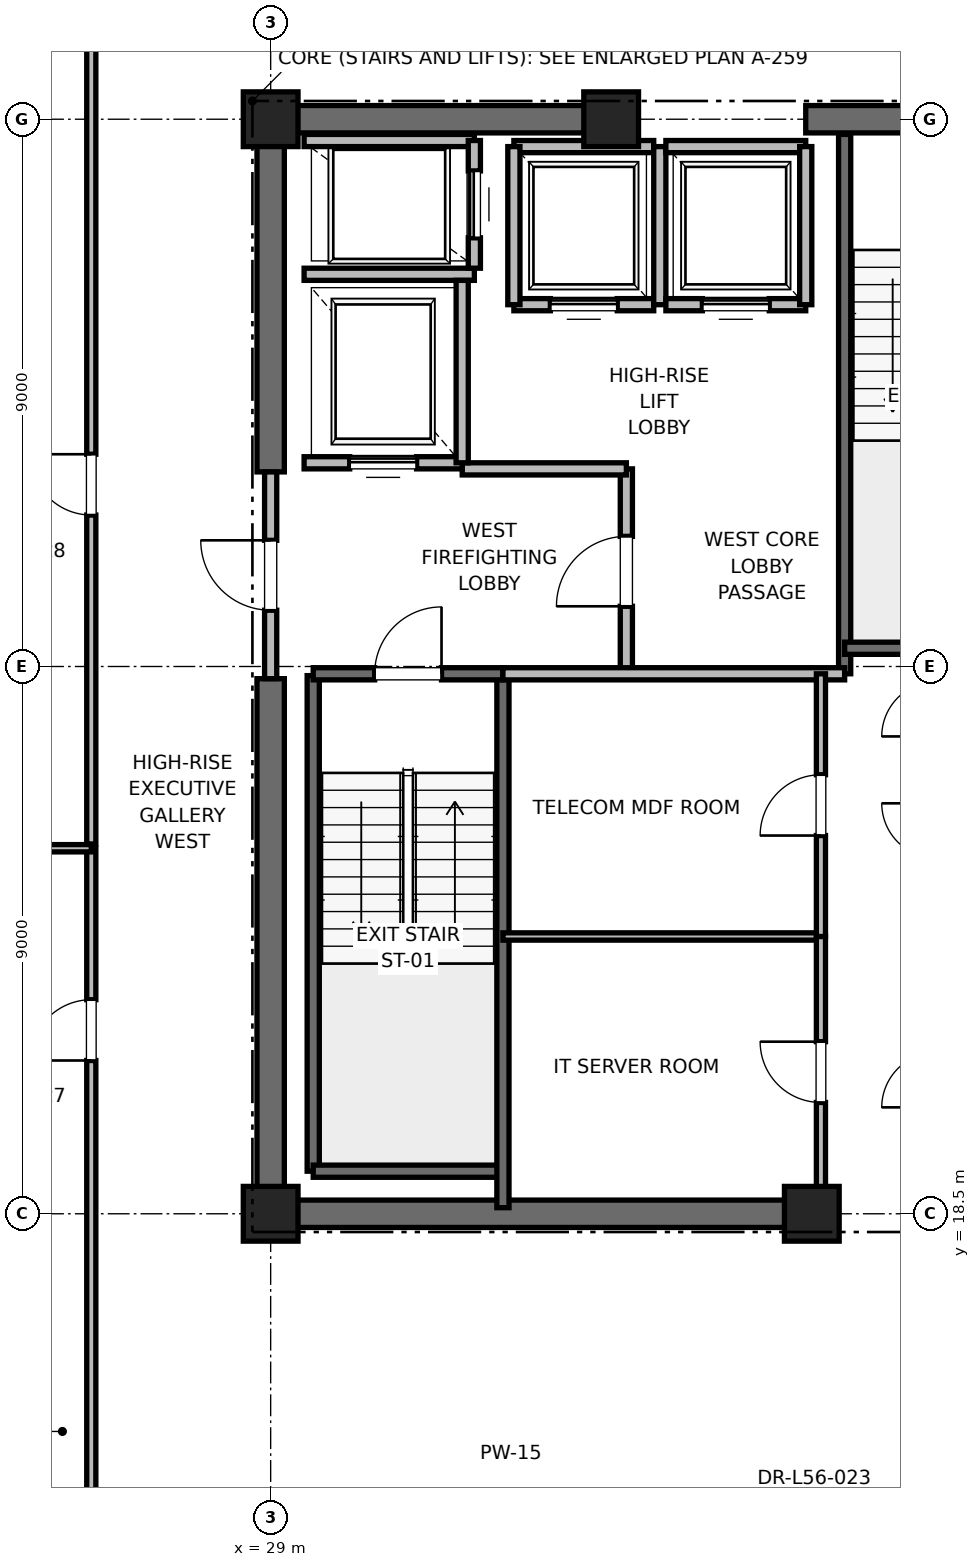
"""IFC4 building model, lengths in metres.
Left out: names, types, materials, properties, quantities, classifications, styles, units other than length and angle.
Written with IfcOpenShell. Run it as: python <this file> out.ifc"""

import sys

from ifc_helpers import new_model, si_unit, direction, frame, frame_2d, origin, origin_2d, place, context, subcontext, project, spatial, rectangle, extrude, element, fill, save


model = new_model("IFC4")
c1 = context("Model", 3, precision=1e-05, world=origin(), true_north=direction((0.0, 1.0)))
c2 = subcontext(c1, "Body", "Model", "MODEL_VIEW")
j1 = project(units=[si_unit("LENGTHUNIT", "METRE"), si_unit("PLANEANGLEUNIT", "RADIAN")], contexts=[c1])
p1 = place(None, origin())
s1 = spatial("IfcSite", under=j1, at=p1, CompositionType="ELEMENT")
p2 = place(p1, origin())
s2 = spatial("IfcBuilding", under=s1, at=p2, CompositionType="ELEMENT")
p3 = place(p2, frame((0.0, 0.0, 243.2)))
s3 = spatial("IfcBuildingStorey", under=s2, at=p3, CompositionType="ELEMENT", Elevation=243.2)
for number, where, z_axis, x_axis in (
    (1, (29.0, 18.5, 0.0), (0.0, 0.0, 1.0), (1.0, 0.0, 0.0)),
    (2, (29.0, 36.5, 0.0), (0.0, 0.0, 1.0), (1.0, 0.0, 0.0)),
    (3, (37.9, 18.5, 0.0), (0.0, 0.0, 1.0), (1.0, 0.0, 0.0)),
    (4, (34.6, 36.5, 0.0), (0.0, 0.0, 1.0), (1.0, 0.0, 0.0)),
):
    element("IfcColumn", number, at=place(p3, frame(where, z_axis=z_axis, x_axis=x_axis)), inside=s3, PredefinedType="PILASTER", context=c2, shape_type="SweptSolid", body=[
        extrude(rectangle(XDim=0.9, YDim=0.9, at=origin_2d()), origin(), (0.0, 0.0, 1.0), 4.0),
    ])
p4 = place(p3, frame((29.0, 18.5, 0.0), z_axis=(0.0, 0.0, 1.0), x_axis=(1.0, 0.0, 0.0)))
e5 = element("IfcWall", 5, at=p4, inside=s3, PredefinedType="SHEAR", context=c2, shape_type="SweptSolid", body=[
    extrude(rectangle(XDim=9.2, YDim=0.45, at=frame_2d((4.6, 0.0))), origin(), (0.0, 0.0, 1.0), 3.785),
])
p5 = place(p3, frame((29.0, 36.5, 0.0), z_axis=(0.0, 0.0, 1.0), x_axis=(1.0, 0.0, 0.0)))
e6 = element("IfcWall", 6, at=p5, inside=s3, PredefinedType="SHEAR", context=c2, shape_type="SweptSolid", body=[
    extrude(rectangle(XDim=5.8, YDim=0.45, at=frame_2d((2.9, 0.0))), origin(), (0.0, 0.0, 1.0), 3.785),
])
p6 = place(p3, frame((37.8, 36.5, 0.0), z_axis=(0.0, 0.0, 1.0), x_axis=(1.0, 0.0, 0.0)))
e7 = element("IfcWall", 7, at=p6, inside=s3, PredefinedType="SHEAR", context=c2, shape_type="SweptSolid", body=[
    extrude(rectangle(XDim=4.4, YDim=0.45, at=frame_2d((2.2, 0.0))), origin(), (0.0, 0.0, 1.0), 3.785),
])
p7 = place(p6, frame((1.65, 0.0, 0.0)))
e8 = element("IfcOpeningElement", 8, at=p7, cuts=e7, PredefinedType="OPENING", context=c2, shape_type="SweptSolid", body=[
    extrude(rectangle(XDim=1.1, YDim=2.15, at=frame_2d((0.55, 1.075))), frame((0.0, 0.225, 0.0), z_axis=(0.0, -1.0, 0.0), x_axis=(1.0, 0.0, 0.0)), (0.0, 0.0, 1.0), 0.45),
])
p8 = place(p3, frame((29.0, 18.5, 0.0), z_axis=(0.0, 0.0, 1.0), x_axis=(0.0, 1.0, 0.0)))
e9 = element("IfcWall", 9, at=p8, inside=s3, PredefinedType="SHEAR", context=c2, shape_type="SweptSolid", body=[
    extrude(rectangle(XDim=8.8, YDim=0.45, at=frame_2d((4.4, 0.0))), origin(), (0.0, 0.0, 1.0), 3.785),
])
p9 = place(p3, frame((29.0, 30.7, 0.0), z_axis=(0.0, 0.0, 1.0), x_axis=(0.0, 1.0, 0.0)))
e10 = element("IfcWall", 10, at=p9, inside=s3, PredefinedType="SHEAR", context=c2, shape_type="SweptSolid", body=[
    extrude(rectangle(XDim=5.8, YDim=0.45, at=frame_2d((2.9, 0.0))), origin(), (0.0, 0.0, 1.0), 3.785),
])
p10 = place(p3, frame((29.7, 19.2, 0.0), z_axis=(0.0, 0.0, 1.0), x_axis=(0.0, 1.0, 0.0)))
e11 = element("IfcWall", 11, at=p10, inside=s3, PredefinedType="SOLIDWALL", context=c2, shape_type="SweptSolid", body=[
    extrude(rectangle(XDim=8.15, YDim=0.2, at=frame_2d((4.075, 0.0))), origin(), (0.0, 0.0, 1.0), 3.785),
])
p11 = place(p3, frame((29.7, 19.2, 0.0), z_axis=(0.0, 0.0, 1.0), x_axis=(1.0, 0.0, 0.0)))
e12 = element("IfcWall", 12, at=p11, inside=s3, PredefinedType="SOLIDWALL", context=c2, shape_type="SweptSolid", body=[
    extrude(rectangle(XDim=3.12, YDim=0.2, at=frame_2d((1.56, 0.0))), origin(), (0.0, 0.0, 1.0), 3.785),
])
p12 = place(p3, frame((32.82, 18.6, 0.0), z_axis=(0.0, 0.0, 1.0), x_axis=(0.0, 1.0, 0.0)))
e13 = element("IfcWall", 13, at=p12, inside=s3, PredefinedType="SOLIDWALL", context=c2, shape_type="SweptSolid", body=[
    extrude(rectangle(XDim=8.78, YDim=0.2, at=frame_2d((4.39, 0.0))), origin(), (0.0, 0.0, 1.0), 3.785),
])
p13 = place(p3, frame((29.7, 27.38, 0.0), z_axis=(0.0, 0.0, 1.0), x_axis=(1.0, 0.0, 0.0)))
e14 = element("IfcWall", 14, at=p13, inside=s3, PredefinedType="SOLIDWALL", context=c2, shape_type="SweptSolid", body=[
    extrude(rectangle(XDim=3.12, YDim=0.2, at=frame_2d((1.56, 0.0))), origin(), (0.0, 0.0, 1.0), 3.785),
])
p14 = place(p13, frame((1.01, 0.0, 0.0)))
e15 = element("IfcOpeningElement", 15, at=p14, cuts=e14, PredefinedType="OPENING", context=c2, shape_type="SweptSolid", body=[
    extrude(rectangle(XDim=1.1, YDim=2.15, at=frame_2d((0.55, 1.075))), frame((0.0, 0.1, 0.0), z_axis=(0.0, -1.0, 0.0), x_axis=(1.0, 0.0, 0.0)), (0.0, 0.0, 1.0), 0.2),
])
p15 = place(p3, frame((38.44, 27.38, 0.0), z_axis=(0.0, 0.0, 1.0), x_axis=(0.0, 1.0, 0.0)))
e16 = element("IfcWall", 16, at=p15, inside=s3, PredefinedType="SOLIDWALL", context=c2, shape_type="SweptSolid", body=[
    extrude(rectangle(XDim=8.87, YDim=0.2, at=frame_2d((4.435, 0.0))), origin(), (0.0, 0.0, 1.0), 3.785),
])
p16 = place(p3, frame((38.44, 27.8, 0.0), z_axis=(0.0, 0.0, 1.0), x_axis=(1.0, 0.0, 0.0)))
e17 = element("IfcWall", 17, at=p16, inside=s3, PredefinedType="SOLIDWALL", context=c2, shape_type="SweptSolid", body=[
    extrude(rectangle(XDim=3.32, YDim=0.2, at=frame_2d((1.66, 0.0))), origin(), (0.0, 0.0, 1.0), 3.785),
])
p17 = place(p3, frame((34.85, 27.38, 0.0), z_axis=(0.0, 0.0, 1.0), x_axis=(0.0, 1.0, 0.0)))
e18 = element("IfcWall", 18, at=p17, inside=s3, PredefinedType="PARTITIONING", context=c2, shape_type="SweptSolid", body=[
    extrude(rectangle(XDim=3.37, YDim=0.2, at=frame_2d((1.685, 0.0))), origin(), (0.0, 0.0, 1.0), 3.785),
])
p18 = place(p17, frame((1.11, 0.0, 0.0)))
e19 = element("IfcOpeningElement", 19, at=p18, cuts=e18, PredefinedType="OPENING", context=c2, shape_type="SweptSolid", body=[
    extrude(rectangle(XDim=1.15, YDim=2.2, at=frame_2d((0.575, 1.1))), frame((0.0, 0.1, 0.0), z_axis=(0.0, -1.0, 0.0), x_axis=(1.0, 0.0, 0.0)), (0.0, 0.0, 1.0), 0.2),
])
p19 = place(p3, frame((29.0, 27.3, 0.0), z_axis=(0.0, 0.0, 1.0), x_axis=(0.0, 1.0, 0.0)))
e20 = element("IfcWall", 20, at=p19, inside=s3, PredefinedType="PARTITIONING", context=c2, shape_type="SweptSolid", body=[
    extrude(rectangle(XDim=3.4, YDim=0.2, at=frame_2d((1.7, 0.0))), origin(), (0.0, 0.0, 1.0), 2.865),
])
p20 = place(p19, frame((1.125, 0.0, 0.0)))
e21 = element("IfcOpeningElement", 21, at=p20, cuts=e20, PredefinedType="OPENING", context=c2, shape_type="SweptSolid", body=[
    extrude(rectangle(XDim=1.15, YDim=2.2, at=frame_2d((0.575, 1.1))), frame((0.0, 0.1, 0.0), z_axis=(0.0, -1.0, 0.0), x_axis=(1.0, 0.0, 0.0)), (0.0, 0.0, 1.0), 0.2),
])
p21 = place(p3, frame((32.82, 27.38, 0.0), z_axis=(0.0, 0.0, 1.0), x_axis=(1.0, 0.0, 0.0)))
e22 = element("IfcWall", 22, at=p21, inside=s3, PredefinedType="PARTITIONING", context=c2, shape_type="SweptSolid", body=[
    extrude(rectangle(XDim=5.62, YDim=0.2, at=frame_2d((2.81, 0.0))), origin(), (0.0, 0.0, 1.0), 3.785),
])
p22 = place(p3, frame((32.15, 30.75, 0.0), z_axis=(0.0, 0.0, 1.0), x_axis=(1.0, 0.0, 0.0)))
e23 = element("IfcWall", 23, at=p22, inside=s3, PredefinedType="PARTITIONING", context=c2, shape_type="SweptSolid", body=[
    extrude(rectangle(XDim=2.7, YDim=0.2, at=frame_2d((1.35, 0.0))), origin(), (0.0, 0.0, 1.0), 3.785),
])
p23 = place(p3, frame((29.55, 30.85, 0.0), z_axis=(0.0, 0.0, 1.0), x_axis=(1.0, 0.0, 0.0)))
e24 = element("IfcWall", 24, at=p23, inside=s3, PredefinedType="SOLIDWALL", context=c2, shape_type="SweptSolid", body=[
    extrude(rectangle(XDim=2.6, YDim=0.2, at=frame_2d((1.3, 0.0))), origin(), (0.0, 0.0, 1.0), 2.865),
])
p24 = place(p23, frame((0.75, 0.0, 0.0)))
e25 = element("IfcOpeningElement", 25, at=p24, cuts=e24, PredefinedType="OPENING", context=c2, shape_type="SweptSolid", body=[
    extrude(rectangle(XDim=1.1, YDim=2.2, at=frame_2d((0.55, 1.1))), frame((0.0, 0.1, 0.0), z_axis=(0.0, -1.0, 0.0), x_axis=(1.0, 0.0, 0.0)), (0.0, 0.0, 1.0), 0.2),
])
p25 = place(p3, frame((29.55, 33.95, 0.0), z_axis=(0.0, 0.0, 1.0), x_axis=(1.0, 0.0, 0.0)))
e26 = element("IfcWall", 26, at=p25, inside=s3, PredefinedType="SOLIDWALL", context=c2, shape_type="SweptSolid", body=[
    extrude(rectangle(XDim=2.8, YDim=0.2, at=frame_2d((1.4, 0.0))), origin(), (0.0, 0.0, 1.0), 3.785),
])
p26 = place(p3, frame((32.15, 30.85, 0.0), z_axis=(0.0, 0.0, 1.0), x_axis=(0.0, 1.0, 0.0)))
e27 = element("IfcWall", 27, at=p26, inside=s3, PredefinedType="SOLIDWALL", context=c2, shape_type="SweptSolid", body=[
    extrude(rectangle(XDim=3.0, YDim=0.2, at=frame_2d((1.5, 0.0))), origin(), (0.0, 0.0, 1.0), 3.785),
])
p27 = place(p3, frame((32.35, 36.15, 0.0), z_axis=(0.0, 0.0, 1.0), x_axis=(-1.0, 0.0, 0.0)))
e28 = element("IfcWall", 28, at=p27, inside=s3, PredefinedType="SOLIDWALL", context=c2, shape_type="SweptSolid", body=[
    extrude(rectangle(XDim=2.8, YDim=0.2, at=frame_2d((1.4, 0.0))), origin(), (0.0, 0.0, 1.0), 3.148),
])
p28 = place(p3, frame((32.35, 34.05, 0.0), z_axis=(0.0, 0.0, 1.0), x_axis=(0.0, 1.0, 0.0)))
e29 = element("IfcWall", 29, at=p28, inside=s3, PredefinedType="SOLIDWALL", context=c2, shape_type="SweptSolid", body=[
    extrude(rectangle(XDim=2.1, YDim=0.2, at=frame_2d((1.05, 0.0))), origin(), (0.0, 0.0, 1.0), 3.785),
])
p29 = place(p28, frame((0.5, 0.0, 0.0)))
e30 = element("IfcOpeningElement", 30, at=p29, cuts=e29, PredefinedType="OPENING", context=c2, shape_type="SweptSolid", body=[
    extrude(rectangle(XDim=1.1, YDim=2.2, at=frame_2d((0.55, 1.1))), frame((0.0, 0.1, 0.0), z_axis=(0.0, -1.0, 0.0), x_axis=(1.0, 0.0, 0.0)), (0.0, 0.0, 1.0), 0.2),
])
p30 = place(p3, frame((33.0, 33.45, 0.0), z_axis=(0.0, 0.0, 1.0), x_axis=(1.0, 0.0, 0.0)))
e31 = element("IfcWall", 31, at=p30, inside=s3, PredefinedType="SOLIDWALL", context=c2, shape_type="SweptSolid", body=[
    extrude(rectangle(XDim=2.3, YDim=0.2, at=frame_2d((1.15, 0.0))), origin(), (0.0, 0.0, 1.0), 3.785),
])
p31 = place(p30, frame((0.6, 0.0, 0.0)))
e32 = element("IfcOpeningElement", 32, at=p31, cuts=e31, PredefinedType="OPENING", context=c2, shape_type="SweptSolid", body=[
    extrude(rectangle(XDim=1.1, YDim=2.2, at=frame_2d((0.55, 1.1))), frame((0.0, 0.1, 0.0), z_axis=(0.0, -1.0, 0.0), x_axis=(1.0, 0.0, 0.0)), (0.0, 0.0, 1.0), 0.2),
])
p32 = place(p3, frame((35.3, 36.05, 0.0), z_axis=(0.0, 0.0, 1.0), x_axis=(-1.0, 0.0, 0.0)))
e33 = element("IfcWall", 33, at=p32, inside=s3, PredefinedType="SOLIDWALL", context=c2, shape_type="SweptSolid", body=[
    extrude(rectangle(XDim=2.3, YDim=0.2, at=frame_2d((1.15, 0.0))), origin(), (0.0, 0.0, 1.0), 2.865),
])
p33 = place(p3, frame((33.0, 36.05, 0.0), z_axis=(0.0, 0.0, 1.0), x_axis=(0.0, -1.0, 0.0)))
e34 = element("IfcWall", 34, at=p33, inside=s3, PredefinedType="SOLIDWALL", context=c2, shape_type="SweptSolid", body=[
    extrude(rectangle(XDim=2.6, YDim=0.2, at=frame_2d((1.3, 0.0))), origin(), (0.0, 0.0, 1.0), 3.785),
])
p34 = place(p3, frame((35.4, 33.45, 0.0), z_axis=(0.0, 0.0, 1.0), x_axis=(0.0, 1.0, 0.0)))
e35 = element("IfcWall", 35, at=p34, inside=s3, PredefinedType="SOLIDWALL", context=c2, shape_type="SweptSolid", body=[
    extrude(rectangle(XDim=2.6, YDim=0.2, at=frame_2d((1.3, 0.0))), origin(), (0.0, 0.0, 1.0), 2.865),
])
p35 = place(p3, frame((35.5, 33.45, 0.0), z_axis=(0.0, 0.0, 1.0), x_axis=(1.0, 0.0, 0.0)))
e36 = element("IfcWall", 36, at=p35, inside=s3, PredefinedType="SOLIDWALL", context=c2, shape_type="SweptSolid", body=[
    extrude(rectangle(XDim=2.3, YDim=0.2, at=frame_2d((1.15, 0.0))), origin(), (0.0, 0.0, 1.0), 3.785),
])
p36 = place(p35, frame((0.6, 0.0, 0.0)))
e37 = element("IfcOpeningElement", 37, at=p36, cuts=e36, PredefinedType="OPENING", context=c2, shape_type="SweptSolid", body=[
    extrude(rectangle(XDim=1.1, YDim=2.2, at=frame_2d((0.55, 1.1))), frame((0.0, 0.1, 0.0), z_axis=(0.0, -1.0, 0.0), x_axis=(1.0, 0.0, 0.0)), (0.0, 0.0, 1.0), 0.2),
])
p37 = place(p3, frame((37.8, 36.05, 0.0), z_axis=(0.0, 0.0, 1.0), x_axis=(-1.0, 0.0, 0.0)))
e38 = element("IfcWall", 38, at=p37, inside=s3, PredefinedType="SOLIDWALL", context=c2, shape_type="SweptSolid", body=[
    extrude(rectangle(XDim=2.3, YDim=0.2, at=frame_2d((1.15, 0.0))), origin(), (0.0, 0.0, 1.0), 2.865),
])
p38 = place(p3, frame((37.8, 33.45, 0.0), z_axis=(0.0, 0.0, 1.0), x_axis=(0.0, 1.0, 0.0)))
e39 = element("IfcWall", 39, at=p38, inside=s3, PredefinedType="SOLIDWALL", context=c2, shape_type="SweptSolid", body=[
    extrude(rectangle(XDim=2.6, YDim=0.2, at=frame_2d((1.3, 0.0))), origin(), (0.0, 0.0, 1.0), 2.865),
])
p39 = place(p3, frame((32.82, 23.06, 0.0), z_axis=(0.0, 0.0, 1.0), x_axis=(1.0, 0.0, 0.0)))
e40 = element("IfcWall", 40, at=p39, inside=s3, PredefinedType="PARTITIONING", context=c2, shape_type="SweptSolid", body=[
    extrude(rectangle(XDim=5.23, YDim=0.12, at=frame_2d((2.615, 0.0))), origin(), (0.0, 0.0, 1.0), 2.85),
])
p40 = place(p3, frame((38.05, 18.6, 0.0), z_axis=(0.0, 0.0, 1.0), x_axis=(0.0, 1.0, 0.0)))
e41 = element("IfcWall", 41, at=p40, inside=s3, PredefinedType="PARTITIONING", context=c2, shape_type="SweptSolid", body=[
    extrude(rectangle(XDim=4.46, YDim=0.15, at=frame_2d((2.23, 0.0))), origin(), (0.0, 0.0, 1.0), 2.85),
])
p41 = place(p40, frame((1.73, 0.0, 0.0)))
e42 = element("IfcOpeningElement", 42, at=p41, cuts=e41, PredefinedType="OPENING", context=c2, shape_type="SweptSolid", body=[
    extrude(rectangle(XDim=1.0, YDim=2.15, at=frame_2d((0.5, 1.075))), frame((0.0, 0.075, 0.0), z_axis=(0.0, -1.0, 0.0), x_axis=(1.0, 0.0, 0.0)), (0.0, 0.0, 1.0), 0.15),
])
p42 = place(p3, frame((38.05, 23.06, 0.0), z_axis=(0.0, 0.0, 1.0), x_axis=(0.0, 1.0, 0.0)))
e43 = element("IfcWall", 43, at=p42, inside=s3, PredefinedType="PARTITIONING", context=c2, shape_type="SweptSolid", body=[
    extrude(rectangle(XDim=4.32, YDim=0.15, at=frame_2d((2.16, 0.0))), origin(), (0.0, 0.0, 1.0), 2.85),
])
p43 = place(p42, frame((1.66, 0.0, 0.0)))
e44 = element("IfcOpeningElement", 44, at=p43, cuts=e43, PredefinedType="OPENING", context=c2, shape_type="SweptSolid", body=[
    extrude(rectangle(XDim=1.0, YDim=2.15, at=frame_2d((0.5, 1.075))), frame((0.0, 0.075, 0.0), z_axis=(0.0, -1.0, 0.0), x_axis=(1.0, 0.0, 0.0)), (0.0, 0.0, 1.0), 0.15),
])
p44 = place(p3, frame((26.05, 8.82, 0.0), z_axis=(0.0, 0.0, 1.0), x_axis=(0.0, 1.0, 0.0)))
e45 = element("IfcWall", 45, at=p44, inside=s3, PredefinedType="PARTITIONING", context=c2, shape_type="SweptSolid", body=[
    extrude(rectangle(XDim=15.691, YDim=0.15, at=frame_2d((7.846, 0.0))), origin(), (0.0, 0.0, 1.0), 2.85),
])
p45 = place(p44, frame((12.201, 0.0, 0.0)))
e46 = element("IfcOpeningElement", 46, at=p45, cuts=e45, PredefinedType="OPENING", context=c2, shape_type="SweptSolid", body=[
    extrude(rectangle(XDim=1.0, YDim=2.15, at=frame_2d((0.5, 1.075))), frame((0.0, 0.075, 0.0), z_axis=(0.0, -1.0, 0.0), x_axis=(1.0, 0.0, 0.0)), (0.0, 0.0, 1.0), 0.15),
])
p46 = place(p3, frame((13.792, 24.511, 0.0), z_axis=(0.0, 0.0, 1.0), x_axis=(1.0, 0.0, 0.0)))
e47 = element("IfcWall", 47, at=p46, inside=s3, PredefinedType="PARTITIONING", context=c2, shape_type="SweptSolid", body=[
    extrude(rectangle(XDim=12.258, YDim=0.12, at=frame_2d((6.129, 0.0))), origin(), (0.0, 0.0, 1.0), 2.85),
])
p47 = place(p3, frame((26.05, 24.581, 0.0), z_axis=(0.0, 0.0, 1.0), x_axis=(0.0, 1.0, 0.0)))
e48 = element("IfcWall", 48, at=p47, inside=s3, PredefinedType="PARTITIONING", context=c2, shape_type="SweptSolid", body=[
    extrude(rectangle(XDim=21.599, YDim=0.15, at=frame_2d((10.799, 0.0))), origin(), (0.0, 0.0, 1.0), 2.85),
])
p48 = place(p47, frame((5.409, 0.0, 0.0)))
e49 = element("IfcOpeningElement", 49, at=p48, cuts=e48, PredefinedType="OPENING", context=c2, shape_type="SweptSolid", body=[
    extrude(rectangle(XDim=1.0, YDim=2.15, at=frame_2d((0.5, 1.075))), frame((0.0, 0.075, 0.0), z_axis=(0.0, -1.0, 0.0), x_axis=(1.0, 0.0, 0.0)), (0.0, 0.0, 1.0), 0.15),
])
p49 = place(p14, origin())
e50 = element("IfcDoor", 50, at=p49, inside=s3, OperationType="SINGLE_SWING_RIGHT", PredefinedType="DOOR", context=c2, shape_type="SweptSolid", body=[
    extrude(rectangle(XDim=1.1, YDim=2.15, at=frame_2d((0.55, 1.075))), frame((0.0, 0.025, 0.0), z_axis=(0.0, -1.0, 0.0), x_axis=(1.0, 0.0, 0.0)), (0.0, 0.0, 1.0), 0.05),
])
fill(e15, e50)
p50 = place(p18, origin())
e51 = element("IfcDoor", 51, at=p50, inside=s3, OperationType="SINGLE_SWING_LEFT", PredefinedType="DOOR", context=c2, shape_type="SweptSolid", body=[
    extrude(rectangle(XDim=1.15, YDim=2.2, at=frame_2d((0.575, 1.1))), frame((0.0, 0.025, 0.0), z_axis=(0.0, -1.0, 0.0), x_axis=(1.0, 0.0, 0.0)), (0.0, 0.0, 1.0), 0.05),
])
fill(e19, e51)
p51 = place(p20, origin())
e52 = element("IfcDoor", 52, at=p51, inside=s3, OperationType="SINGLE_SWING_RIGHT", PredefinedType="DOOR", context=c2, shape_type="SweptSolid", body=[
    extrude(rectangle(XDim=1.15, YDim=2.2, at=frame_2d((0.575, 1.1))), frame((0.0, 0.025, 0.0), z_axis=(0.0, -1.0, 0.0), x_axis=(1.0, 0.0, 0.0)), (0.0, 0.0, 1.0), 0.05),
])
fill(e21, e52)
p52 = place(p24, origin())
e53 = element("IfcDoor", 53, at=p52, inside=s3, OperationType="SLIDING_TO_RIGHT", PredefinedType="DOOR", context=c2, shape_type="SweptSolid", body=[
    extrude(rectangle(XDim=1.1, YDim=2.2, at=frame_2d((0.55, 1.1))), frame((0.0, 0.025, 0.0), z_axis=(0.0, -1.0, 0.0), x_axis=(1.0, 0.0, 0.0)), (0.0, 0.0, 1.0), 0.05),
])
fill(e25, e53)
p53 = place(p29, origin())
e54 = element("IfcDoor", 54, at=p53, inside=s3, OperationType="SLIDING_TO_RIGHT", PredefinedType="DOOR", context=c2, shape_type="SweptSolid", body=[
    extrude(rectangle(XDim=1.1, YDim=2.2, at=frame_2d((0.55, 1.1))), frame((0.0, 0.025, 0.0), z_axis=(0.0, -1.0, 0.0), x_axis=(1.0, 0.0, 0.0)), (0.0, 0.0, 1.0), 0.05),
])
fill(e30, e54)
p54 = place(p31, origin())
e55 = element("IfcDoor", 55, at=p54, inside=s3, OperationType="SLIDING_TO_RIGHT", PredefinedType="DOOR", context=c2, shape_type="SweptSolid", body=[
    extrude(rectangle(XDim=1.1, YDim=2.2, at=frame_2d((0.55, 1.1))), frame((0.0, 0.025, 0.0), z_axis=(0.0, -1.0, 0.0), x_axis=(1.0, 0.0, 0.0)), (0.0, 0.0, 1.0), 0.05),
])
fill(e32, e55)
p55 = place(p36, origin())
e56 = element("IfcDoor", 56, at=p55, inside=s3, OperationType="SLIDING_TO_RIGHT", PredefinedType="DOOR", context=c2, shape_type="SweptSolid", body=[
    extrude(rectangle(XDim=1.1, YDim=2.2, at=frame_2d((0.55, 1.1))), frame((0.0, 0.025, 0.0), z_axis=(0.0, -1.0, 0.0), x_axis=(1.0, 0.0, 0.0)), (0.0, 0.0, 1.0), 0.05),
])
fill(e37, e56)
p56 = place(p41, origin())
e57 = element("IfcDoor", 57, at=p56, inside=s3, OperationType="SINGLE_SWING_RIGHT", PredefinedType="DOOR", context=c2, shape_type="SweptSolid", body=[
    extrude(rectangle(XDim=1.0, YDim=2.15, at=frame_2d((0.5, 1.075))), frame((0.0, 0.025, 0.0), z_axis=(0.0, -1.0, 0.0), x_axis=(1.0, 0.0, 0.0)), (0.0, 0.0, 1.0), 0.05),
])
fill(e42, e57)
p57 = place(p43, origin())
e58 = element("IfcDoor", 58, at=p57, inside=s3, OperationType="SINGLE_SWING_LEFT", PredefinedType="DOOR", context=c2, shape_type="SweptSolid", body=[
    extrude(rectangle(XDim=1.0, YDim=2.15, at=frame_2d((0.5, 1.075))), frame((0.0, 0.025, 0.0), z_axis=(0.0, -1.0, 0.0), x_axis=(1.0, 0.0, 0.0)), (0.0, 0.0, 1.0), 0.05),
])
fill(e44, e58)
p58 = place(p45, origin())
e59 = element("IfcDoor", 59, at=p58, inside=s3, OperationType="SINGLE_SWING_LEFT", PredefinedType="DOOR", context=c2, shape_type="SweptSolid", body=[
    extrude(rectangle(XDim=1.0, YDim=2.15, at=frame_2d((0.5, 1.075))), frame((0.0, 0.025, 0.0), z_axis=(0.0, -1.0, 0.0), x_axis=(1.0, 0.0, 0.0)), (0.0, 0.0, 1.0), 0.05),
])
fill(e46, e59)
p59 = place(p48, origin())
e60 = element("IfcDoor", 60, at=p59, inside=s3, OperationType="SINGLE_SWING_RIGHT", PredefinedType="DOOR", context=c2, shape_type="SweptSolid", body=[
    extrude(rectangle(XDim=1.0, YDim=2.15, at=frame_2d((0.5, 1.075))), frame((0.0, 0.025, 0.0), z_axis=(0.0, -1.0, 0.0), x_axis=(1.0, 0.0, 0.0)), (0.0, 0.0, 1.0), 0.05),
])
fill(e49, e60)
save(model, sys.argv[1])
